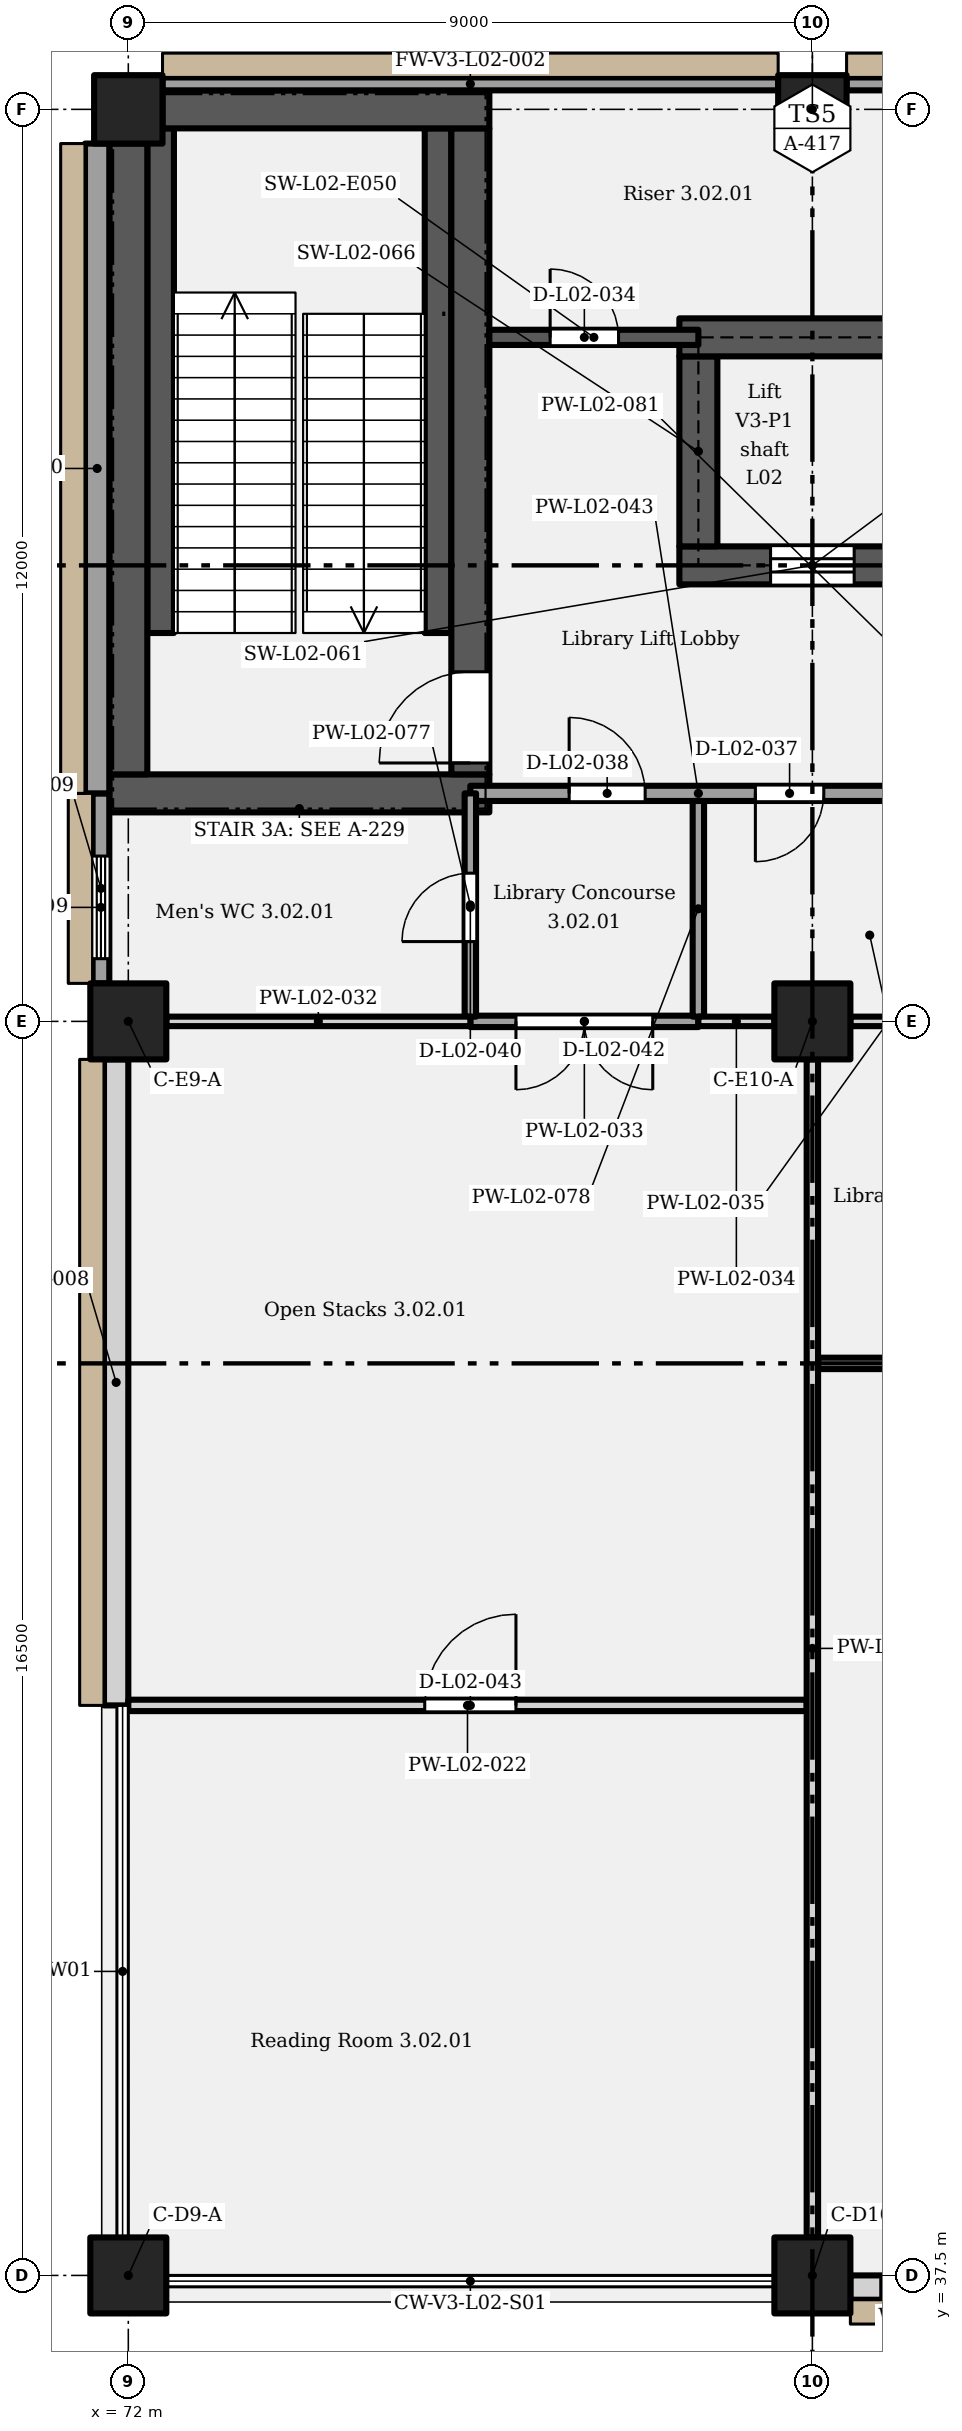
"""IFC4 building model, lengths in metres.
Left out: names, types, materials, properties, quantities, classifications, styles, units other than length and angle.
Written with IfcOpenShell. Run it as: python <this file> out.ifc"""

import sys

from ifc_helpers import new_model, si_unit, direction, frame, frame_2d, origin, origin_2d, place, context, subcontext, project, spatial, rectangle, extrude, element, fill, save


model = new_model("IFC4")
c1 = context("Model", 3, precision=1e-05, world=origin(), true_north=direction((0.0, 1.0)))
c2 = subcontext(c1, "Body", "Model", "MODEL_VIEW")
j1 = project(units=[si_unit("LENGTHUNIT", "METRE"), si_unit("PLANEANGLEUNIT", "RADIAN")], contexts=[c1])
p1 = place(None, origin())
s1 = spatial("IfcSite", under=j1, at=p1, CompositionType="ELEMENT")
p2 = place(p1, origin())
s2 = spatial("IfcBuilding", under=s1, at=p2, CompositionType="ELEMENT")
p3 = place(p2, frame((0.0, 0.0, 12.0)))
s3 = spatial("IfcBuildingStorey", under=s2, at=p3, CompositionType="ELEMENT", Elevation=12.0)
for number, where, z_axis, x_axis in (
    (1, (72.0, 37.5, 0.0), (0.0, 0.0, 1.0), (1.0, 0.0, 0.0)),
    (2, (81.0, 37.5, 0.0), (0.0, 0.0, 1.0), (1.0, 0.0, 0.0)),
    (3, (72.0, 54.0, 0.0), (0.0, 0.0, 1.0), (1.0, 0.0, 0.0)),
    (4, (81.0, 54.0, 0.0), (0.0, 0.0, 1.0), (1.0, 0.0, 0.0)),
):
    element("IfcColumn", number, at=place(p3, frame(where, z_axis=z_axis, x_axis=x_axis)), inside=s3, PredefinedType="COLUMN", context=c2, shape_type="SweptSolid", body=[
        extrude(rectangle(XDim=1.0, YDim=1.0, at=origin_2d()), origin(), (0.0, 0.0, 1.0), 5.4),
    ])
for number, where, z_axis, x_axis in (
    (5, (72.0, 66.0, 0.0), (0.0, 0.0, 1.0), (1.0, 0.0, 0.0)),
    (6, (81.0, 66.0, 0.0), (0.0, 0.0, 1.0), (1.0, 0.0, 0.0)),
):
    element("IfcColumn", number, at=place(p3, frame(where, z_axis=z_axis, x_axis=x_axis)), inside=s3, PredefinedType="COLUMN", context=c2, shape_type="SweptSolid", body=[
        extrude(rectangle(XDim=0.9, YDim=0.9, at=origin_2d()), origin(), (0.0, 0.0, 1.0), 5.4),
    ])
p4 = place(p3, frame((71.75, 57.0, 0.0), z_axis=(0.0, 0.0, 1.0), x_axis=(1.0, 0.0, 0.0)))
e7 = element("IfcWall", 7, at=p4, inside=s3, PredefinedType="SHEAR", context=c2, shape_type="SweptSolid", body=[
    extrude(rectangle(XDim=5.0, YDim=0.5, at=frame_2d((2.5, 0.0))), origin(), (0.0, 0.0, 1.0), 5.15),
])
p5 = place(p3, frame((72.0, 57.25, 0.0), z_axis=(0.0, 0.0, 1.0), x_axis=(0.0, 1.0, 0.0)))
e8 = element("IfcWall", 8, at=p5, inside=s3, PredefinedType="SHEAR", context=c2, shape_type="SweptSolid", body=[
    extrude(rectangle(XDim=8.3, YDim=0.5, at=frame_2d((4.15, 0.0))), origin(), (0.0, 0.0, 1.0), 5.15),
])
p6 = place(p3, frame((76.5, 57.25, 0.0), z_axis=(0.0, 0.0, 1.0), x_axis=(0.0, 1.0, 0.0)))
e9 = element("IfcWall", 9, at=p6, inside=s3, PredefinedType="SHEAR", context=c2, shape_type="SweptSolid", body=[
    extrude(rectangle(XDim=8.5, YDim=0.5, at=frame_2d((4.25, 0.0))), origin(), (0.0, 0.0, 1.0), 5.15),
])
p7 = place(p6, frame((0.15, 0.0, 0.0)))
e10 = element("IfcOpeningElement", 10, at=p7, cuts=e9, PredefinedType="OPENING", context=c2, shape_type="SweptSolid", body=[
    extrude(rectangle(XDim=1.2, YDim=2.1, at=frame_2d((0.6, 1.05))), frame((0.0, 0.26, 0.0), z_axis=(0.0, -1.0, 0.0), x_axis=(1.0, 0.0, 0.0)), (0.0, 0.0, 1.0), 0.52),
])
p8 = place(p3, frame((79.25, 60.0, 0.0), z_axis=(0.0, 0.0, 1.0), x_axis=(1.0, 0.0, 0.0)))
e11 = element("IfcWall", 11, at=p8, inside=s3, PredefinedType="SHEAR", context=c2, shape_type="SweptSolid", body=[
    extrude(rectangle(XDim=3.5, YDim=0.5, at=frame_2d((1.75, 0.0))), origin(), (0.0, 0.0, 1.0), 5.15),
])
p9 = place(p8, frame((1.2, 0.0, 0.0)))
e12 = element("IfcOpeningElement", 12, at=p9, cuts=e11, PredefinedType="OPENING", context=c2, shape_type="SweptSolid", body=[
    extrude(rectangle(XDim=1.1, YDim=2.1, at=frame_2d((0.55, 1.05))), frame((0.0, 0.26, 0.0), z_axis=(0.0, -1.0, 0.0), x_axis=(1.0, 0.0, 0.0)), (0.0, 0.0, 1.0), 0.52),
])
p10 = place(p3, frame((79.5, 60.25, 0.0), z_axis=(0.0, 0.0, 1.0), x_axis=(0.0, 1.0, 0.0)))
e13 = element("IfcWall", 13, at=p10, inside=s3, PredefinedType="SHEAR", context=c2, shape_type="SweptSolid", body=[
    extrude(rectangle(XDim=2.5, YDim=0.5, at=frame_2d((1.25, 0.0))), origin(), (0.0, 0.0, 1.0), 5.15),
])
p11 = place(p3, frame((79.25, 63.0, 0.0), z_axis=(0.0, 0.0, 1.0), x_axis=(1.0, 0.0, 0.0)))
e14 = element("IfcWall", 14, at=p11, inside=s3, PredefinedType="SHEAR", context=c2, shape_type="SweptSolid", body=[
    extrude(rectangle(XDim=6.0, YDim=0.5, at=frame_2d((3.0, 0.0))), origin(), (0.0, 0.0, 1.0), 5.15),
])
p12 = place(p11, frame((4.2, 0.0, 0.0)))
e15 = element("IfcOpeningElement", 15, at=p12, cuts=e14, PredefinedType="OPENING", context=c2, shape_type="SweptSolid", body=[
    extrude(rectangle(XDim=1.1, YDim=2.1, at=frame_2d((0.55, 1.05))), frame((0.0, 0.26, 0.0), z_axis=(0.0, -1.0, 0.0), x_axis=(1.0, 0.0, 0.0)), (0.0, 0.0, 1.0), 0.52),
])
p13 = place(p3, frame((72.45, 66.0, 0.0), z_axis=(0.0, 0.0, 1.0), x_axis=(1.0, 0.0, 0.0)))
e16 = element("IfcWall", 16, at=p13, inside=s3, PredefinedType="SHEAR", context=c2, shape_type="SweptSolid", body=[
    extrude(rectangle(XDim=4.3, YDim=0.5, at=frame_2d((2.15, 0.0))), origin(), (0.0, 0.0, 1.0), 5.15),
])
p14 = place(p3, frame((81.5, 37.34, 0.0), z_axis=(0.0, 0.0, 1.0), x_axis=(1.0, 0.0, 0.0)))
e17 = element("IfcWall", 17, at=p14, inside=s3, PredefinedType="SOLIDWALL", context=c2, shape_type="SweptSolid", body=[
    extrude(rectangle(XDim=8.05, YDim=0.32, at=frame_2d((4.025, 0.0))), origin(), (0.0, 0.0, 1.0), 5.15),
])
p15 = place(p14, frame((0.4, 0.0, 1.2)))
e18 = element("IfcOpeningElement", 18, at=p15, cuts=e17, PredefinedType="OPENING", context=c2, shape_type="SweptSolid", body=[
    extrude(rectangle(XDim=1.2, YDim=2.1, at=frame_2d((0.6, 1.05))), frame((0.0, 0.17, 0.0), z_axis=(0.0, -1.0, 0.0), x_axis=(1.0, 0.0, 0.0)), (0.0, 0.0, 1.0), 0.34),
])
p16 = place(p14, frame((3.4, 0.0, 1.2)))
e19 = element("IfcOpeningElement", 19, at=p16, cuts=e17, PredefinedType="OPENING", context=c2, shape_type="SweptSolid", body=[
    extrude(rectangle(XDim=1.2, YDim=2.1, at=frame_2d((0.6, 1.05))), frame((0.0, 0.17, 0.0), z_axis=(0.0, -1.0, 0.0), x_axis=(1.0, 0.0, 0.0)), (0.0, 0.0, 1.0), 0.34),
])
p17 = place(p14, frame((6.4, 0.0, 1.2)))
e20 = element("IfcOpeningElement", 20, at=p17, cuts=e17, PredefinedType="OPENING", context=c2, shape_type="SweptSolid", body=[
    extrude(rectangle(XDim=1.2, YDim=2.1, at=frame_2d((0.6, 1.05))), frame((0.0, 0.17, 0.0), z_axis=(0.0, -1.0, 0.0), x_axis=(1.0, 0.0, 0.0)), (0.0, 0.0, 1.0), 0.34),
])
for number, where, z_axis, x_axis in (
    (21, (72.45, 66.335, 0.0), (0.0, 0.0, 1.0), (1.0, 0.0, 0.0)),
    (22, (81.45, 66.335, 0.0), (0.0, 0.0, 1.0), (1.0, 0.0, 0.0)),
):
    element("IfcWall", number, at=place(p3, frame(where, z_axis=z_axis, x_axis=x_axis)), inside=s3, PredefinedType="SOLIDWALL", context=c2, shape_type="SweptSolid", body=[
        extrude(rectangle(XDim=8.1, YDim=0.17, at=frame_2d((4.05, 0.0))), origin(), (0.0, 0.0, 1.0), 5.15),
    ])
p18 = place(p3, frame((71.84, 45.0, 0.0), z_axis=(0.0, 0.0, 1.0), x_axis=(0.0, 1.0, 0.0)))
e23 = element("IfcWall", 23, at=p18, inside=s3, PredefinedType="SOLIDWALL", context=c2, shape_type="SweptSolid", body=[
    extrude(rectangle(XDim=8.5, YDim=0.32, at=frame_2d((4.25, 0.0))), origin(), (0.0, 0.0, 1.0), 5.15),
])
p19 = place(p3, frame((71.64, 54.5, 0.0), z_axis=(0.0, 0.0, 1.0), x_axis=(0.0, 1.0, 0.0)))
e24 = element("IfcWall", 24, at=p19, inside=s3, PredefinedType="SOLIDWALL", context=c2, shape_type="SweptSolid", body=[
    extrude(rectangle(XDim=2.5, YDim=0.22, at=frame_2d((1.25, 0.0))), origin(), (0.0, 0.0, 1.0), 5.15),
])
p20 = place(p19, frame((0.325, 0.0, 1.2)))
e25 = element("IfcOpeningElement", 25, at=p20, cuts=e24, PredefinedType="OPENING", context=c2, shape_type="SweptSolid", body=[
    extrude(rectangle(XDim=1.35, YDim=2.55, at=frame_2d((0.675, 1.275))), frame((0.0, 0.12, 0.0), z_axis=(0.0, -1.0, 0.0), x_axis=(1.0, 0.0, 0.0)), (0.0, 0.0, 1.0), 0.24),
])
p21 = place(p3, frame((71.59, 57.0, 0.0), z_axis=(0.0, 0.0, 1.0), x_axis=(0.0, 1.0, 0.0)))
e26 = element("IfcWall", 26, at=p21, inside=s3, PredefinedType="SOLIDWALL", context=c2, shape_type="SweptSolid", body=[
    extrude(rectangle(XDim=8.55, YDim=0.32, at=frame_2d((4.275, 0.0))), origin(), (0.0, 0.0, 1.0), 5.15),
])
p22 = place(p3, frame((72.0, 45.0, 0.0), z_axis=(0.0, 0.0, 1.0), x_axis=(1.0, 0.0, 0.0)))
e27 = element("IfcWall", 27, at=p22, inside=s3, PredefinedType="PARTITIONING", context=c2, shape_type="SweptSolid", body=[
    extrude(rectangle(XDim=8.925, YDim=0.15, at=frame_2d((4.462, 0.0))), origin(), (0.0, 0.0, 1.0), 5.15),
])
p23 = place(p22, frame((3.9, 0.0, 0.0)))
e28 = element("IfcOpeningElement", 28, at=p23, cuts=e27, PredefinedType="OPENING", context=c2, shape_type="SweptSolid", body=[
    extrude(rectangle(XDim=1.2, YDim=2.4, at=frame_2d((0.6, 1.2))), frame((0.0, 0.085, 0.0), z_axis=(0.0, -1.0, 0.0), x_axis=(1.0, 0.0, 0.0)), (0.0, 0.0, 1.0), 0.17),
])
p24 = place(p3, frame((81.075, 49.5, 0.0), z_axis=(0.0, 0.0, 1.0), x_axis=(1.0, 0.0, 0.0)))
e29 = element("IfcWall", 29, at=p24, inside=s3, PredefinedType="PARTITIONING", context=c2, shape_type="SweptSolid", body=[
    extrude(rectangle(XDim=8.925, YDim=0.15, at=frame_2d((4.462, 0.0))), origin(), (0.0, 0.0, 1.0), 5.15),
])
p25 = place(p24, frame((2.625, 0.0, 0.0), z_axis=(0.0, 0.0, 1.0), x_axis=(-1.0, 0.0, 0.0)))
e30 = element("IfcOpeningElement", 30, at=p25, cuts=e29, PredefinedType="OPENING", context=c2, shape_type="SweptSolid", body=[
    extrude(rectangle(XDim=0.9, YDim=2.1, at=frame_2d((0.45, 1.05))), frame((0.0, 0.085, 0.0), z_axis=(0.0, -1.0, 0.0), x_axis=(1.0, 0.0, 0.0)), (0.0, 0.0, 1.0), 0.17),
])
p26 = place(p3, frame((72.5, 54.0, 0.0), z_axis=(0.0, 0.0, 1.0), x_axis=(1.0, 0.0, 0.0)))
e31 = element("IfcWall", 31, at=p26, inside=s3, PredefinedType="PARTITIONING", context=c2, shape_type="SweptSolid", body=[
    extrude(rectangle(XDim=4.0, YDim=0.125, at=frame_2d((2.0, 0.0))), origin(), (0.0, 0.0, 1.0), 4.4),
])
p27 = place(p3, frame((76.5, 54.0, 0.0), z_axis=(0.0, 0.0, 1.0), x_axis=(1.0, 0.0, 0.0)))
e32 = element("IfcWall", 32, at=p27, inside=s3, PredefinedType="PARTITIONING", context=c2, shape_type="SweptSolid", body=[
    extrude(rectangle(XDim=3.0, YDim=0.15, at=frame_2d((1.5, 0.0))), origin(), (0.0, 0.0, 1.0), 4.4),
])
p28 = place(p27, frame((2.4, 0.0, 0.0), z_axis=(0.0, 0.0, 1.0), x_axis=(-1.0, 0.0, 0.0)))
e33 = element("IfcOpeningElement", 33, at=p28, cuts=e32, PredefinedType="OPENING", context=c2, shape_type="SweptSolid", body=[
    extrude(rectangle(XDim=1.8, YDim=2.4, at=frame_2d((0.9, 1.2))), frame((0.0, 0.085, 0.0), z_axis=(0.0, -1.0, 0.0), x_axis=(1.0, 0.0, 0.0)), (0.0, 0.0, 1.0), 0.17),
])
for number, where, z_axis, x_axis in (
    (34, (79.5, 54.0, 0.0), (0.0, 0.0, 1.0), (1.0, 0.0, 0.0)),
    (35, (81.5, 54.0, 0.0), (0.0, 0.0, 1.0), (1.0, 0.0, 0.0)),
):
    element("IfcWall", number, at=place(p3, frame(where, z_axis=z_axis, x_axis=x_axis)), inside=s3, PredefinedType="PARTITIONING", context=c2, shape_type="SweptSolid", body=[
        extrude(rectangle(XDim=1.0, YDim=0.125, at=frame_2d((0.5, 0.0))), origin(), (0.0, 0.0, 1.0), 4.4),
    ])
p29 = place(p3, frame((76.5, 57.0, 0.0), z_axis=(0.0, 0.0, 1.0), x_axis=(1.0, 0.0, 0.0)))
e36 = element("IfcWall", 36, at=p29, inside=s3, PredefinedType="PARTITIONING", context=c2, shape_type="SweptSolid", body=[
    extrude(rectangle(XDim=6.0, YDim=0.2, at=frame_2d((3.0, 0.0))), origin(), (0.0, 0.0, 1.0), 5.15),
])
p30 = place(p29, frame((4.65, 0.0, 0.0), z_axis=(0.0, 0.0, 1.0), x_axis=(-1.0, 0.0, 0.0)))
e37 = element("IfcOpeningElement", 37, at=p30, cuts=e36, PredefinedType="OPENING", context=c2, shape_type="SweptSolid", body=[
    extrude(rectangle(XDim=0.9, YDim=2.1, at=frame_2d((0.45, 1.05))), frame((0.0, 0.11, 0.0), z_axis=(0.0, -1.0, 0.0), x_axis=(1.0, 0.0, 0.0)), (0.0, 0.0, 1.0), 0.22),
])
p31 = place(p29, frame((1.3, 0.0, 0.0)))
e38 = element("IfcOpeningElement", 38, at=p31, cuts=e36, PredefinedType="OPENING", context=c2, shape_type="SweptSolid", body=[
    extrude(rectangle(XDim=1.0, YDim=2.1, at=frame_2d((0.5, 1.05))), frame((0.0, 0.11, 0.0), z_axis=(0.0, -1.0, 0.0), x_axis=(1.0, 0.0, 0.0)), (0.0, 0.0, 1.0), 0.22),
])
p32 = place(p3, frame((76.75, 63.0, 0.0), z_axis=(0.0, 0.0, 1.0), x_axis=(1.0, 0.0, 0.0)))
e39 = element("IfcWall", 39, at=p32, inside=s3, PredefinedType="SHEAR", context=c2, shape_type="SweptSolid", body=[
    extrude(rectangle(XDim=2.75, YDim=0.2, at=frame_2d((1.375, 0.0))), origin(), (0.0, 0.0, 1.0), 5.15),
])
p33 = place(p32, frame((0.8, 0.0, 0.0)))
e40 = element("IfcOpeningElement", 40, at=p33, cuts=e39, PredefinedType="OPENING", context=c2, shape_type="SweptSolid", body=[
    extrude(rectangle(XDim=0.9, YDim=2.0, at=frame_2d((0.45, 1.0))), frame((0.0, 0.11, 0.0), z_axis=(0.0, -1.0, 0.0), x_axis=(1.0, 0.0, 0.0)), (0.0, 0.0, 1.0), 0.22),
])
p34 = place(p3, frame((76.5, 54.062, 0.0), z_axis=(0.0, 0.0, 1.0), x_axis=(0.0, 1.0, 0.0)))
e41 = element("IfcWall", 41, at=p34, inside=s3, PredefinedType="PARTITIONING", context=c2, shape_type="SweptSolid", body=[
    extrude(rectangle(XDim=2.938, YDim=0.15, at=frame_2d((1.469, 0.0))), origin(), (0.0, 0.0, 1.0), 5.15),
])
p35 = place(p34, frame((0.988, 0.0, 0.0)))
e42 = element("IfcOpeningElement", 42, at=p35, cuts=e41, PredefinedType="OPENING", context=c2, shape_type="SweptSolid", body=[
    extrude(rectangle(XDim=0.9, YDim=2.1, at=frame_2d((0.45, 1.05))), frame((0.0, 0.085, 0.0), z_axis=(0.0, -1.0, 0.0), x_axis=(1.0, 0.0, 0.0)), (0.0, 0.0, 1.0), 0.17),
])
p36 = place(p3, frame((79.5, 54.062, 0.0), z_axis=(0.0, 0.0, 1.0), x_axis=(0.0, 1.0, 0.0)))
e43 = element("IfcWall", 43, at=p36, inside=s3, PredefinedType="PARTITIONING", context=c2, shape_type="SweptSolid", body=[
    extrude(rectangle(XDim=2.837, YDim=0.15, at=frame_2d((1.419, 0.0))), origin(), (0.0, 0.0, 1.0), 5.15),
])
p37 = place(p3, frame((81.0, 38.0, 0.0), z_axis=(0.0, 0.0, 1.0), x_axis=(0.0, 1.0, 0.0)))
e44 = element("IfcWall", 44, at=p37, inside=s3, PredefinedType="PARTITIONING", context=c2, shape_type="SweptSolid", body=[
    extrude(rectangle(XDim=15.5, YDim=0.15, at=frame_2d((7.75, 0.0))), origin(), (0.0, 0.0, 1.0), 4.2),
])
p38 = place(p3, frame((72.425, 59.11, 0.0), z_axis=(0.0, 0.0, 1.0), x_axis=(0.0, 1.0, 0.0)))
e45 = element("IfcWall", 45, at=p38, inside=s3, PredefinedType="SHEAR", context=c2, shape_type="SweptSolid", body=[
    extrude(rectangle(XDim=6.64, YDim=0.35, at=frame_2d((3.32, 0.0))), origin(), (0.0, 0.0, 1.0), 5.15),
])
p39 = place(p3, frame((76.075, 59.11, 0.0), z_axis=(0.0, 0.0, 1.0), x_axis=(0.0, 1.0, 0.0)))
e46 = element("IfcWall", 46, at=p39, inside=s3, PredefinedType="SHEAR", context=c2, shape_type="SweptSolid", body=[
    extrude(rectangle(XDim=6.64, YDim=0.35, at=frame_2d((3.32, 0.0))), origin(), (0.0, 0.0, 1.0), 2.587),
])
p40 = place(p15, origin())
e47 = element("IfcWindow", 47, at=p40, inside=s3, PartitioningType="SINGLE_PANEL", PredefinedType="WINDOW", context=c2, shape_type="SweptSolid", body=[
    extrude(rectangle(XDim=1.2, YDim=2.1, at=frame_2d((0.6, 1.05))), frame((0.0, 0.03, 0.0), z_axis=(0.0, -1.0, 0.0), x_axis=(1.0, 0.0, 0.0)), (0.0, 0.0, 1.0), 0.06),
])
fill(e18, e47)
p41 = place(p20, origin())
e48 = element("IfcWindow", 48, at=p41, inside=s3, PartitioningType="SINGLE_PANEL", PredefinedType="WINDOW", context=c2, shape_type="SweptSolid", body=[
    extrude(rectangle(XDim=1.35, YDim=2.55, at=frame_2d((0.675, 1.275))), frame((0.0, 0.03, 0.0), z_axis=(0.0, -1.0, 0.0), x_axis=(1.0, 0.0, 0.0)), (0.0, 0.0, 1.0), 0.06),
])
fill(e25, e48)
p42 = place(p7, origin())
e49 = element("IfcDoor", 49, at=p42, inside=s3, OperationType="SINGLE_SWING_LEFT", PredefinedType="DOOR", context=c2, shape_type="SweptSolid", body=[
    extrude(rectangle(XDim=1.2, YDim=2.1, at=frame_2d((0.6, 1.05))), frame((0.0, 0.025, 0.0), z_axis=(0.0, -1.0, 0.0), x_axis=(1.0, 0.0, 0.0)), (0.0, 0.0, 1.0), 0.05),
])
fill(e10, e49)
p43 = place(p9, origin())
e50 = element("IfcDoor", 50, at=p43, inside=s3, OperationType="SLIDING_TO_LEFT", PredefinedType="DOOR", context=c2, shape_type="SweptSolid", body=[
    extrude(rectangle(XDim=1.1, YDim=2.1, at=frame_2d((0.55, 1.05))), frame((0.0, 0.025, 0.0), z_axis=(0.0, -1.0, 0.0), x_axis=(1.0, 0.0, 0.0)), (0.0, 0.0, 1.0), 0.05),
])
fill(e12, e50)
p44 = place(p33, origin())
e51 = element("IfcDoor", 51, at=p44, inside=s3, OperationType="SINGLE_SWING_LEFT", PredefinedType="DOOR", context=c2, shape_type="SweptSolid", body=[
    extrude(rectangle(XDim=0.9, YDim=2.0, at=frame_2d((0.45, 1.0))), frame((0.0, 0.025, 0.0), z_axis=(0.0, -1.0, 0.0), x_axis=(1.0, 0.0, 0.0)), (0.0, 0.0, 1.0), 0.05),
])
fill(e40, e51)
p45 = place(p30, origin())
e52 = element("IfcDoor", 52, at=p45, inside=s3, OperationType="SINGLE_SWING_RIGHT", PredefinedType="DOOR", context=c2, shape_type="SweptSolid", body=[
    extrude(rectangle(XDim=0.9, YDim=2.1, at=frame_2d((0.45, 1.05))), frame((0.0, 0.025, 0.0), z_axis=(0.0, -1.0, 0.0), x_axis=(1.0, 0.0, 0.0)), (0.0, 0.0, 1.0), 0.05),
])
fill(e37, e52)
p46 = place(p31, origin())
e53 = element("IfcDoor", 53, at=p46, inside=s3, OperationType="SINGLE_SWING_LEFT", PredefinedType="DOOR", context=c2, shape_type="SweptSolid", body=[
    extrude(rectangle(XDim=1.0, YDim=2.1, at=frame_2d((0.5, 1.05))), frame((0.0, 0.025, 0.0), z_axis=(0.0, -1.0, 0.0), x_axis=(1.0, 0.0, 0.0)), (0.0, 0.0, 1.0), 0.05),
])
fill(e38, e53)
p47 = place(p35, origin())
e54 = element("IfcDoor", 54, at=p47, inside=s3, OperationType="SINGLE_SWING_LEFT", PredefinedType="DOOR", context=c2, shape_type="SweptSolid", body=[
    extrude(rectangle(XDim=0.9, YDim=2.1, at=frame_2d((0.45, 1.05))), frame((0.0, 0.025, 0.0), z_axis=(0.0, -1.0, 0.0), x_axis=(1.0, 0.0, 0.0)), (0.0, 0.0, 1.0), 0.05),
])
fill(e42, e54)
p48 = place(p28, origin())
e55 = element("IfcDoor", 55, at=p48, inside=s3, OperationType="DOUBLE_DOOR_SINGLE_SWING", PredefinedType="DOOR", context=c2, shape_type="SweptSolid", body=[
    extrude(rectangle(XDim=1.8, YDim=2.4, at=frame_2d((0.9, 1.2))), frame((0.0, 0.025, 0.0), z_axis=(0.0, -1.0, 0.0), x_axis=(1.0, 0.0, 0.0)), (0.0, 0.0, 1.0), 0.05),
])
fill(e33, e55)
p49 = place(p23, origin())
e56 = element("IfcDoor", 56, at=p49, inside=s3, OperationType="SINGLE_SWING_RIGHT", PredefinedType="DOOR", context=c2, shape_type="SweptSolid", body=[
    extrude(rectangle(XDim=1.2, YDim=2.4, at=frame_2d((0.6, 1.2))), frame((0.0, 0.025, 0.0), z_axis=(0.0, -1.0, 0.0), x_axis=(1.0, 0.0, 0.0)), (0.0, 0.0, 1.0), 0.05),
])
fill(e28, e56)
save(model, sys.argv[1])
